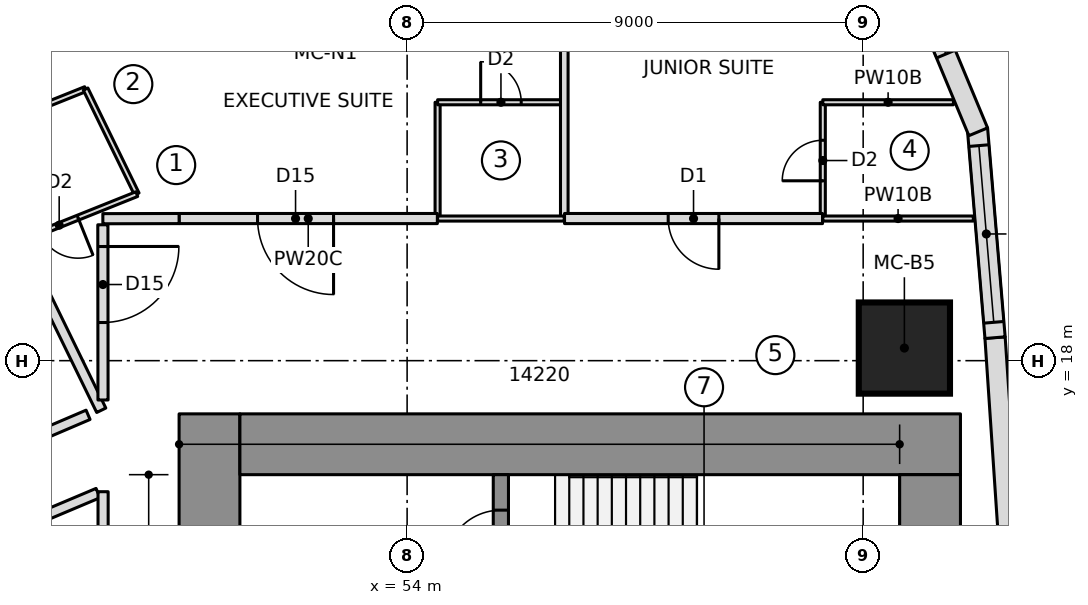
"""IFC4 building model, lengths in metres.
Left out: names, types, materials, properties, quantities, classifications, styles, units other than length and angle.
Written with IfcOpenShell. Run it as: python <this file> out.ifc"""

import sys

from ifc_helpers import new_model, si_unit, direction, frame, frame_2d, origin, origin_2d, place, context, subcontext, project, spatial, polyline, rectangle, outline, extrude, element, fill, save


model = new_model("IFC4")
c1 = context("Model", 3, precision=1e-05, world=origin(), true_north=direction((0.0, 1.0)))
c2 = subcontext(c1, "Body", "Model", "MODEL_VIEW")
j1 = project(units=[si_unit("LENGTHUNIT", "METRE"), si_unit("PLANEANGLEUNIT", "RADIAN")], contexts=[c1])
p1 = place(None, origin())
s1 = spatial("IfcSite", under=j1, at=p1, CompositionType="ELEMENT")
p2 = place(p1, origin())
s2 = spatial("IfcBuilding", under=s1, at=p2, CompositionType="ELEMENT")
p3 = place(p2, frame((0.0, 0.0, 50.25)))
s3 = spatial("IfcBuildingStorey", under=s2, at=p3, CompositionType="ELEMENT", Elevation=50.25)
p4 = place(p3, frame((50.1, 6.65, 0.0), z_axis=(0.0, 0.0, 1.0), x_axis=(0.0, 1.0, 0.0)))
e1 = element("IfcWall", 1, at=p4, inside=s3, PredefinedType="SHEAR", context=c2, shape_type="SweptSolid", body=[
    extrude(rectangle(XDim=10.3, YDim=1.2, at=frame_2d((5.15, 0.0))), origin(), (0.0, 0.0, 1.0), 3.55),
])
p5 = place(p4, frame((6.5, 0.0, 0.0)))
e2 = element("IfcOpeningElement", 2, at=p5, cuts=e1, PredefinedType="OPENING", context=c2, shape_type="SweptSolid", body=[
    extrude(rectangle(XDim=1.1, YDim=2.1, at=frame_2d((0.55, 1.05))), frame((0.0, 0.61, 0.0), z_axis=(0.0, -1.0, 0.0), x_axis=(1.0, 0.0, 0.0)), (0.0, 0.0, 1.0), 1.22),
])
p6 = place(p3, frame((50.7, 16.35, 0.0), z_axis=(0.0, 0.0, 1.0), x_axis=(1.0, 0.0, 0.0)))
e3 = element("IfcWall", 3, at=p6, inside=s3, PredefinedType="SHEAR", context=c2, shape_type="SweptSolid", body=[
    extrude(rectangle(XDim=14.22, YDim=1.2, at=frame_2d((7.11, 0.0))), origin(), (0.0, 0.0, 1.0), 3.55),
])
p7 = place(p3, frame((64.32, 9.95, 0.0), z_axis=(0.0, 0.0, 1.0), x_axis=(0.0, 1.0, 0.0)))
e4 = element("IfcWall", 4, at=p7, inside=s3, PredefinedType="SHEAR", context=c2, shape_type="SweptSolid", body=[
    extrude(rectangle(XDim=5.8, YDim=1.2, at=frame_2d((2.9, 0.0))), origin(), (0.0, 0.0, 1.0), 3.55),
])
p8 = place(p3, frame((55.85, 10.35, 0.0), z_axis=(0.0, 0.0, 1.0), x_axis=(0.0, 1.0, 0.0)))
e5 = element("IfcWall", 5, at=p8, inside=s3, PredefinedType="SHEAR", context=c2, shape_type="SweptSolid", body=[
    extrude(rectangle(XDim=5.4, YDim=0.3, at=frame_2d((2.7, 0.0))), origin(), (0.0, 0.0, 1.0), 3.55),
])
p9 = place(p8, frame((1.43, 0.0, 0.0)))
e6 = element("IfcOpeningElement", 6, at=p9, cuts=e5, PredefinedType="OPENING", context=c2, shape_type="SweptSolid", body=[
    extrude(rectangle(XDim=1.1, YDim=2.1, at=frame_2d((0.55, 1.05))), frame((0.0, 0.16, 0.0), z_axis=(0.0, -1.0, 0.0), x_axis=(1.0, 0.0, 0.0)), (0.0, 0.0, 1.0), 0.32),
])
p10 = place(p8, frame((3.6, 0.0, 0.0)))
e7 = element("IfcOpeningElement", 7, at=p10, cuts=e5, PredefinedType="OPENING", context=c2, shape_type="SweptSolid", body=[
    extrude(rectangle(XDim=1.1, YDim=2.1, at=frame_2d((0.55, 1.05))), frame((0.0, 0.16, 0.0), z_axis=(0.0, -1.0, 0.0), x_axis=(1.0, 0.0, 0.0)), (0.0, 0.0, 1.0), 0.32),
])
p11 = place(p3, frame((63.813, 18.249, 0.0), z_axis=(0.0, 0.0, 1.0), x_axis=(1.0, 0.0, 0.0)))
e8 = element("IfcColumn", 8, at=p11, inside=s3, PredefinedType="COLUMN", context=c2, shape_type="SweptSolid", body=[
    extrude(rectangle(XDim=1.8, YDim=1.8, at=origin_2d()), origin(), (0.0, 0.0, 1.0), 3.55),
])
p12 = place(p3, frame((65.878, 14.36, 0.0), z_axis=(0.0, 0.0, 1.0), x_axis=(-0.067087430225, 0.997747100575, 0.0)))
e9 = element("IfcWall", 9, at=p12, inside=s3, PredefinedType="NOTDEFINED", context=c2, shape_type="SweptSolid", body=[
    extrude(outline(polyline([(-0.002, -0.2), (4.107, -0.2), (4.103, 0.2), (0.002, 0.2), (-0.002, -0.2)])), origin(), (0.0, 0.0, 1.0), 3.25),
])
p13 = place(p3, frame((65.603, 18.455, 0.0), z_axis=(0.0, 0.0, 1.0), x_axis=(-0.083793550906, 0.996483136248, 0.0)))
e10 = element("IfcWall", 10, at=p13, inside=s3, PredefinedType="NOTDEFINED", context=c2, shape_type="SweptSolid", body=[
    extrude(outline(polyline([(-0.002, -0.2), (4.136, -0.2), (4.074, 0.2), (0.002, 0.2), (-0.002, -0.2)])), origin(), (0.0, 0.0, 1.0), 3.25),
])
p14 = place(p13, frame((0.302, 0.0, 0.9)))
e11 = element("IfcOpeningElement", 11, at=p14, cuts=e10, PredefinedType="OPENING", context=c2, shape_type="SweptSolid", body=[
    extrude(rectangle(XDim=3.5, YDim=1.8, at=frame_2d((1.75, 0.9))), frame((0.0, 0.21, 0.0), z_axis=(0.0, -1.0, 0.0), x_axis=(1.0, 0.0, 0.0)), (0.0, 0.0, 1.0), 0.42),
])
p15 = place(p3, frame((65.259, 22.546, 0.0), z_axis=(0.0, 0.0, 1.0), x_axis=(-0.384372042685, 0.923178277908, 0.0)))
e12 = element("IfcWall", 12, at=p15, inside=s3, PredefinedType="NOTDEFINED", context=c2, shape_type="SweptSolid", body=[
    extrude(outline(polyline([(-0.031, -0.2), (4.408, -0.2), (4.283, 0.2), (0.031, 0.2), (-0.031, -0.2)])), origin(), (0.0, 0.0, 1.0), 3.25),
])
p16 = place(p15, frame((1.631, 0.0, 0.6)))
e13 = element("IfcOpeningElement", 13, at=p16, cuts=e12, PredefinedType="OPENING", context=c2, shape_type="SweptSolid", body=[
    extrude(outline(polyline([(0.0, 1.35), (0.084, 1.771), (0.322, 2.128), (0.679, 2.366), (1.1, 2.45), (1.521, 2.366), (1.878, 2.128), (2.116, 1.771), (2.2, 1.35), (2.2, 1.1), (2.116, 0.679), (1.878, 0.322), (1.521, 0.084), (1.1, 0.0), (0.679, 0.084), (0.322, 0.322), (0.084, 0.679), (0.0, 1.1), (0.0, 1.35)])), frame((0.0, 0.21, 0.0), z_axis=(0.0, -1.0, 0.0), x_axis=(1.0, 0.0, 0.0)), (0.0, 0.0, 1.0), 0.42),
])
p17 = place(p3, frame((54.602, 20.8, 0.0), z_axis=(0.0, 0.0, 1.0), x_axis=(0.0, 1.0, 0.0)))
e14 = element("IfcWall", 14, at=p17, inside=s3, PredefinedType="PARTITIONING", context=c2, shape_type="SweptSolid", body=[
    extrude(rectangle(XDim=2.3, YDim=0.1, at=frame_2d((1.15, 0.0))), origin(), (0.0, 0.0, 1.0), 3.25),
])
p18 = place(p3, frame((54.602, 23.1, 0.0), z_axis=(0.0, 0.0, 1.0), x_axis=(1.0, 0.0, 0.0)))
e15 = element("IfcWall", 15, at=p18, inside=s3, PredefinedType="PARTITIONING", context=c2, shape_type="SweptSolid", body=[
    extrude(rectangle(XDim=2.5, YDim=0.1, at=frame_2d((1.25, 0.0))), origin(), (0.0, 0.0, 1.0), 3.25),
])
p19 = place(p18, frame((0.85, 0.0, 0.0)))
e16 = element("IfcOpeningElement", 16, at=p19, cuts=e15, PredefinedType="OPENING", context=c2, shape_type="SweptSolid", body=[
    extrude(rectangle(XDim=0.8, YDim=2.1, at=frame_2d((0.4, 1.05))), frame((0.0, 0.06, 0.0), z_axis=(0.0, -1.0, 0.0), x_axis=(1.0, 0.0, 0.0)), (0.0, 0.0, 1.0), 0.12),
])
p20 = place(p3, frame((62.203, 20.8, 0.0), z_axis=(0.0, 0.0, 1.0), x_axis=(0.0, 1.0, 0.0)))
e17 = element("IfcWall", 17, at=p20, inside=s3, PredefinedType="PARTITIONING", context=c2, shape_type="SweptSolid", body=[
    extrude(rectangle(XDim=2.3, YDim=0.1, at=frame_2d((1.15, 0.0))), origin(), (0.0, 0.0, 1.0), 3.25),
])
p21 = place(p20, frame((0.75, 0.0, 0.0)))
e18 = element("IfcOpeningElement", 18, at=p21, cuts=e17, PredefinedType="OPENING", context=c2, shape_type="SweptSolid", body=[
    extrude(rectangle(XDim=0.8, YDim=2.1, at=frame_2d((0.4, 1.05))), frame((0.0, 0.06, 0.0), z_axis=(0.0, -1.0, 0.0), x_axis=(1.0, 0.0, 0.0)), (0.0, 0.0, 1.0), 0.12),
])
p22 = place(p3, frame((62.203, 23.1, 0.0), z_axis=(0.0, 0.0, 1.0), x_axis=(1.0, 0.0, 0.0)))
e19 = element("IfcWall", 19, at=p22, inside=s3, PredefinedType="PARTITIONING", context=c2, shape_type="SweptSolid", body=[
    extrude(rectangle(XDim=2.578, YDim=0.1, at=frame_2d((1.289, 0.0))), origin(), (0.0, 0.0, 1.0), 3.25),
])
p23 = place(p3, frame((57.102, 20.8, 0.0), z_axis=(0.0, 0.0, 1.0), x_axis=(0.0, 1.0, 0.0)))
e20 = element("IfcWall", 20, at=p23, inside=s3, PredefinedType="PARTITIONING", context=c2, shape_type="SweptSolid", body=[
    extrude(rectangle(XDim=7.787, YDim=0.15, at=frame_2d((3.894, 0.0))), origin(), (0.0, 0.0, 1.0), 3.25),
])
p24 = place(p3, frame((47.964, 17.021, 0.0), z_axis=(0.0, 0.0, 1.0), x_axis=(-0.438207101073, 0.898874038211, 0.0)))
e21 = element("IfcWall", 21, at=p24, inside=s3, PredefinedType="PARTITIONING", context=c2, shape_type="SweptSolid", body=[
    extrude(rectangle(XDim=7.62, YDim=0.2, at=frame_2d((3.81, 0.0))), origin(), (0.0, 0.0, 1.0), 3.25),
])
p25 = place(p3, frame((45.328, 22.428, 0.0), z_axis=(0.0, 0.0, 1.0), x_axis=(0.928288495333, 0.371860819975, 0.0)))
e22 = element("IfcWall", 22, at=p25, inside=s3, PredefinedType="PARTITIONING", context=c2, shape_type="SweptSolid", body=[
    extrude(rectangle(XDim=2.507, YDim=0.1, at=frame_2d((1.253, 0.0))), origin(), (0.0, 0.0, 1.0), 3.25),
])
p26 = place(p3, frame((47.655, 23.361, 0.0), z_axis=(0.0, 0.0, 1.0), x_axis=(0.438171240168, -0.898891519756, 0.0)))
e23 = element("IfcWall", 23, at=p26, inside=s3, PredefinedType="PARTITIONING", context=c2, shape_type="SweptSolid", body=[
    extrude(rectangle(XDim=2.306, YDim=0.1, at=frame_2d((1.153, 0.0))), origin(), (0.0, 0.0, 1.0), 3.25),
])
p27 = place(p3, frame((48.665, 21.288, 0.0), z_axis=(0.0, 0.0, 1.0), x_axis=(-0.928288495333, -0.371860819975, 0.0)))
e24 = element("IfcWall", 24, at=p27, inside=s3, PredefinedType="PARTITIONING", context=c2, shape_type="SweptSolid", body=[
    extrude(rectangle(XDim=2.507, YDim=0.1, at=frame_2d((1.253, 0.0))), origin(), (0.0, 0.0, 1.0), 3.25),
])
p28 = place(p27, frame((1.25, 0.0, 0.0)))
e25 = element("IfcOpeningElement", 25, at=p28, cuts=e24, PredefinedType="OPENING", context=c2, shape_type="SweptSolid", body=[
    extrude(rectangle(XDim=0.8, YDim=2.1, at=frame_2d((0.4, 1.05))), frame((0.0, 0.06, 0.0), z_axis=(0.0, -1.0, 0.0), x_axis=(1.0, 0.0, 0.0)), (0.0, 0.0, 1.0), 0.12),
])
p29 = place(p3, frame((43.85, 13.677, 0.0), z_axis=(0.0, 0.0, 1.0), x_axis=(0.921265924084, 0.388933281068, 0.0)))
e26 = element("IfcWall", 26, at=p29, inside=s3, PredefinedType="PARTITIONING", context=c2, shape_type="SweptSolid", body=[
    extrude(rectangle(XDim=4.396, YDim=0.2, at=frame_2d((2.198, 0.0))), origin(), (0.0, 0.0, 1.0), 3.25),
])
p30 = place(p29, frame((1.508, 0.0, 0.0)))
e27 = element("IfcOpeningElement", 27, at=p30, cuts=e26, PredefinedType="OPENING", context=c2, shape_type="SweptSolid", body=[
    extrude(rectangle(XDim=1.0, YDim=2.1, at=frame_2d((0.5, 1.05))), frame((0.0, 0.11, 0.0), z_axis=(0.0, -1.0, 0.0), x_axis=(1.0, 0.0, 0.0)), (0.0, 0.0, 1.0), 0.22),
])
p31 = place(p3, frame((54.597, 20.805, 0.0), z_axis=(0.0, 0.0, 1.0), x_axis=(-1.0, 0.0, 0.0)))
e28 = element("IfcWall", 28, at=p31, inside=s3, PredefinedType="PARTITIONING", context=c2, shape_type="SweptSolid", body=[
    extrude(rectangle(XDim=5.097, YDim=0.2, at=frame_2d((2.548, 0.0))), origin(), (0.0, 0.0, 1.0), 3.25),
])
p32 = place(p31, frame((2.048, 0.0, 0.0)))
e29 = element("IfcOpeningElement", 29, at=p32, cuts=e28, PredefinedType="OPENING", context=c2, shape_type="SweptSolid", body=[
    extrude(rectangle(XDim=1.5, YDim=2.1, at=frame_2d((0.75, 1.05))), frame((0.0, 0.11, 0.0), z_axis=(0.0, -1.0, 0.0), x_axis=(1.0, 0.0, 0.0)), (0.0, 0.0, 1.0), 0.22),
])
p33 = place(p3, frame((62.198, 20.805, 0.0), z_axis=(0.0, 0.0, 1.0), x_axis=(-1.0, 0.0, 0.0)))
e30 = element("IfcWall", 30, at=p33, inside=s3, PredefinedType="PARTITIONING", context=c2, shape_type="SweptSolid", body=[
    extrude(rectangle(XDim=5.092, YDim=0.2, at=frame_2d((2.546, 0.0))), origin(), (0.0, 0.0, 1.0), 3.25),
])
p34 = place(p33, frame((2.046, 0.0, 0.0)))
e31 = element("IfcOpeningElement", 31, at=p34, cuts=e30, PredefinedType="OPENING", context=c2, shape_type="SweptSolid", body=[
    extrude(rectangle(XDim=1.0, YDim=2.1, at=frame_2d((0.5, 1.05))), frame((0.0, 0.11, 0.0), z_axis=(0.0, -1.0, 0.0), x_axis=(1.0, 0.0, 0.0)), (0.0, 0.0, 1.0), 0.22),
])
p35 = place(p3, frame((57.102, 20.805, 0.0), z_axis=(0.0, 0.0, 1.0), x_axis=(-1.0, 0.0, 0.0)))
e32 = element("IfcWall", 32, at=p35, inside=s3, PredefinedType="PARTITIONING", context=c2, shape_type="SweptSolid", body=[
    extrude(rectangle(XDim=2.5, YDim=0.1, at=frame_2d((1.25, 0.0))), origin(), (0.0, 0.0, 1.0), 3.25),
])
p36 = place(p3, frame((65.175, 20.805, 0.0), z_axis=(0.0, 0.0, 1.0), x_axis=(-1.0, 0.0, 0.0)))
e33 = element("IfcWall", 33, at=p36, inside=s3, PredefinedType="PARTITIONING", context=c2, shape_type="SweptSolid", body=[
    extrude(rectangle(XDim=2.971, YDim=0.1, at=frame_2d((1.486, 0.0))), origin(), (0.0, 0.0, 1.0), 3.25),
])
p37 = place(p3, frame((47.704, 16.931, 0.0), z_axis=(0.0, 0.0, 1.0), x_axis=(-0.919360612497, -0.39341589214, 0.0)))
e34 = element("IfcWall", 34, at=p37, inside=s3, PredefinedType="PARTITIONING", context=c2, shape_type="SweptSolid", body=[
    extrude(rectangle(XDim=8.137, YDim=0.2, at=frame_2d((4.068, 0.0))), origin(), (0.0, 0.0, 1.0), 3.25),
])
p38 = place(p37, frame((3.568, 0.0, 0.0)))
e35 = element("IfcOpeningElement", 35, at=p38, cuts=e34, PredefinedType="OPENING", context=c2, shape_type="SweptSolid", body=[
    extrude(rectangle(XDim=1.0, YDim=2.1, at=frame_2d((0.5, 1.05))), frame((0.0, 0.11, 0.0), z_axis=(0.0, -1.0, 0.0), x_axis=(1.0, 0.0, 0.0)), (0.0, 0.0, 1.0), 0.22),
])
p39 = place(p3, frame((48.0, 15.414, 0.0), z_axis=(0.0, 0.0, 1.0), x_axis=(0.0, -1.0, 0.0)))
e36 = element("IfcWall", 36, at=p39, inside=s3, PredefinedType="PARTITIONING", context=c2, shape_type="SweptSolid", body=[
    extrude(rectangle(XDim=30.828, YDim=0.2, at=frame_2d((15.414, 0.0))), origin(), (0.0, 0.0, 1.0), 3.25),
])
p40 = place(p3, frame((49.5, 20.805, 0.0), z_axis=(0.0, 0.0, 1.0), x_axis=(-0.999998104399, -0.001947099992, 0.0)))
e37 = element("IfcWall", 37, at=p40, inside=s3, PredefinedType="PARTITIONING", context=c2, shape_type="SweptSolid", body=[
    extrude(rectangle(XDim=1.505, YDim=0.2, at=frame_2d((0.752, 0.0))), origin(), (0.0, 0.0, 1.0), 3.25),
])
p41 = place(p3, frame((47.996, 20.682, 0.0), z_axis=(0.0, 0.0, 1.0), x_axis=(0.000847217996, -0.999999641111, 0.0)))
e38 = element("IfcWall", 38, at=p41, inside=s3, PredefinedType="PARTITIONING", context=c2, shape_type="SweptSolid", body=[
    extrude(rectangle(XDim=3.458, YDim=0.2, at=frame_2d((1.729, 0.0))), origin(), (0.0, 0.0, 1.0), 3.25),
])
p42 = place(p41, frame((0.429, 0.0, 0.0)))
e39 = element("IfcOpeningElement", 39, at=p42, cuts=e38, PredefinedType="OPENING", context=c2, shape_type="SweptSolid", body=[
    extrude(rectangle(XDim=1.5, YDim=2.1, at=frame_2d((0.75, 1.05))), frame((0.0, 0.11, 0.0), z_axis=(0.0, -1.0, 0.0), x_axis=(1.0, 0.0, 0.0)), (0.0, 0.0, 1.0), 0.22),
])
p43 = place(p14, origin())
e40 = element("IfcWindow", 40, at=p43, inside=s3, PartitioningType="SINGLE_PANEL", PredefinedType="WINDOW", context=c2, shape_type="SweptSolid", body=[
    extrude(rectangle(XDim=3.5, YDim=1.8, at=frame_2d((1.75, 0.9))), frame((0.0, 0.17, 0.0), z_axis=(0.0, -1.0, 0.0), x_axis=(1.0, 0.0, 0.0)), (0.0, 0.0, 1.0), 0.06),
])
fill(e11, e40)
p44 = place(p16, origin())
e41 = element("IfcWindow", 41, at=p44, inside=s3, PartitioningType="SINGLE_PANEL", PredefinedType="WINDOW", context=c2, shape_type="SweptSolid", body=[
    extrude(outline(polyline([(0.0, 1.35), (0.084, 1.771), (0.322, 2.128), (0.679, 2.366), (1.1, 2.45), (1.521, 2.366), (1.878, 2.128), (2.116, 1.771), (2.2, 1.35), (2.2, 1.1), (2.116, 0.679), (1.878, 0.322), (1.521, 0.084), (1.1, 0.0), (0.679, 0.084), (0.322, 0.322), (0.084, 0.679), (0.0, 1.1), (0.0, 1.35)])), frame((0.0, 0.17, 0.0), z_axis=(0.0, -1.0, 0.0), x_axis=(1.0, 0.0, 0.0)), (0.0, 0.0, 1.0), 0.06),
])
fill(e13, e41)
p45 = place(p19, origin())
e42 = element("IfcDoor", 42, at=p45, inside=s3, OperationType="SINGLE_SWING_LEFT", PredefinedType="DOOR", context=c2, shape_type="SweptSolid", body=[
    extrude(rectangle(XDim=0.8, YDim=2.1, at=frame_2d((0.4, 1.05))), frame((0.0, 0.025, 0.0), z_axis=(0.0, -1.0, 0.0), x_axis=(1.0, 0.0, 0.0)), (0.0, 0.0, 1.0), 0.05),
])
fill(e16, e42)
p46 = place(p21, origin())
e43 = element("IfcDoor", 43, at=p46, inside=s3, OperationType="SINGLE_SWING_LEFT", PredefinedType="DOOR", context=c2, shape_type="SweptSolid", body=[
    extrude(rectangle(XDim=0.8, YDim=2.1, at=frame_2d((0.4, 1.05))), frame((0.0, 0.025, 0.0), z_axis=(0.0, -1.0, 0.0), x_axis=(1.0, 0.0, 0.0)), (0.0, 0.0, 1.0), 0.05),
])
fill(e18, e43)
p47 = place(p28, origin())
e44 = element("IfcDoor", 44, at=p47, inside=s3, OperationType="SINGLE_SWING_LEFT", PredefinedType="DOOR", context=c2, shape_type="SweptSolid", body=[
    extrude(rectangle(XDim=0.8, YDim=2.1, at=frame_2d((0.4, 1.05))), frame((0.0, 0.025, 0.0), z_axis=(0.0, -1.0, 0.0), x_axis=(1.0, 0.0, 0.0)), (0.0, 0.0, 1.0), 0.05),
])
fill(e25, e44)
p48 = place(p32, origin())
e45 = element("IfcDoor", 45, at=p48, inside=s3, OperationType="DOUBLE_DOOR_SINGLE_SWING", PredefinedType="DOOR", context=c2, shape_type="SweptSolid", body=[
    extrude(rectangle(XDim=1.5, YDim=2.1, at=frame_2d((0.75, 1.05))), frame((0.0, 0.025, 0.0), z_axis=(0.0, -1.0, 0.0), x_axis=(1.0, 0.0, 0.0)), (0.0, 0.0, 1.0), 0.05),
])
fill(e29, e45)
p49 = place(p34, origin())
e46 = element("IfcDoor", 46, at=p49, inside=s3, OperationType="SINGLE_SWING_LEFT", PredefinedType="DOOR", context=c2, shape_type="SweptSolid", body=[
    extrude(rectangle(XDim=1.0, YDim=2.1, at=frame_2d((0.5, 1.05))), frame((0.0, 0.025, 0.0), z_axis=(0.0, -1.0, 0.0), x_axis=(1.0, 0.0, 0.0)), (0.0, 0.0, 1.0), 0.05),
])
fill(e31, e46)
p50 = place(p42, origin())
e47 = element("IfcDoor", 47, at=p50, inside=s3, OperationType="DOUBLE_DOOR_SINGLE_SWING", PredefinedType="DOOR", context=c2, shape_type="SweptSolid", body=[
    extrude(rectangle(XDim=1.5, YDim=2.1, at=frame_2d((0.75, 1.05))), frame((0.0, 0.025, 0.0), z_axis=(0.0, -1.0, 0.0), x_axis=(1.0, 0.0, 0.0)), (0.0, 0.0, 1.0), 0.05),
])
fill(e39, e47)
p51 = place(p10, origin())
e48 = element("IfcDoor", 48, at=p51, inside=s3, OperationType="SINGLE_SWING_RIGHT", PredefinedType="DOOR", context=c2, shape_type="SweptSolid", body=[
    extrude(rectangle(XDim=1.1, YDim=2.1, at=frame_2d((0.55, 1.05))), frame((0.0, 0.025, 0.0), z_axis=(0.0, -1.0, 0.0), x_axis=(1.0, 0.0, 0.0)), (0.0, 0.0, 1.0), 0.05),
])
fill(e7, e48)
save(model, sys.argv[1])
